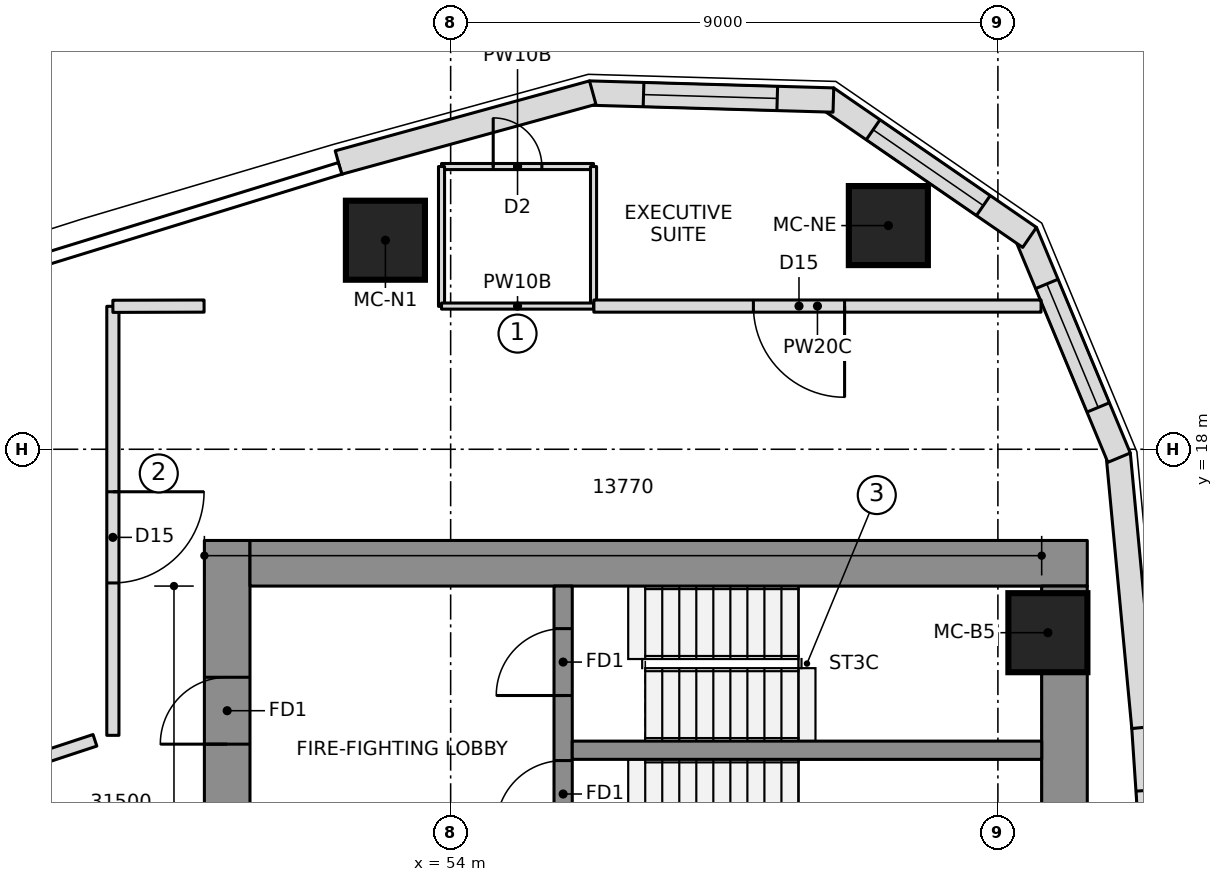
"""IFC4 building model, lengths in metres.
Left out: names, types, materials, properties, quantities, classifications, styles, units other than length and angle.
Written with IfcOpenShell. Run it as: python <this file> out.ifc"""

import sys

from ifc_helpers import new_model, si_unit, direction, frame, frame_2d, origin, origin_2d, place, context, subcontext, project, spatial, polyline, rectangle, outline, extrude, element, fill, save


model = new_model("IFC4")
c1 = context("Model", 3, precision=1e-05, world=origin(), true_north=direction((0.0, 1.0)))
c2 = subcontext(c1, "Body", "Model", "MODEL_VIEW")
j1 = project(units=[si_unit("LENGTHUNIT", "METRE"), si_unit("PLANEANGLEUNIT", "RADIAN")], contexts=[c1])
p1 = place(None, origin())
s1 = spatial("IfcSite", under=j1, at=p1, CompositionType="ELEMENT")
p2 = place(p1, origin())
s2 = spatial("IfcBuilding", under=s1, at=p2, CompositionType="ELEMENT")
p3 = place(p2, frame((0.0, 0.0, 182.6)))
s3 = spatial("IfcBuildingStorey", under=s2, at=p3, CompositionType="ELEMENT", Elevation=182.6)
p4 = place(p3, frame((50.325, 6.65, 0.0), z_axis=(0.0, 0.0, 1.0), x_axis=(0.0, 1.0, 0.0)))
e1 = element("IfcWall", 1, at=p4, inside=s3, PredefinedType="SHEAR", context=c2, shape_type="SweptSolid", body=[
    extrude(rectangle(XDim=9.85, YDim=0.75, at=frame_2d((4.925, 0.0))), origin(), (0.0, 0.0, 1.0), 3.55),
])
p5 = place(p4, frame((6.5, 0.0, 0.0)))
e2 = element("IfcOpeningElement", 2, at=p5, cuts=e1, PredefinedType="OPENING", context=c2, shape_type="SweptSolid", body=[
    extrude(rectangle(XDim=1.1, YDim=2.1, at=frame_2d((0.55, 1.05))), frame((0.0, 0.385, 0.0), z_axis=(0.0, -1.0, 0.0), x_axis=(1.0, 0.0, 0.0)), (0.0, 0.0, 1.0), 0.77),
])
p6 = place(p3, frame((50.7, 16.125, 0.0), z_axis=(0.0, 0.0, 1.0), x_axis=(1.0, 0.0, 0.0)))
e3 = element("IfcWall", 3, at=p6, inside=s3, PredefinedType="SHEAR", context=c2, shape_type="SweptSolid", body=[
    extrude(rectangle(XDim=13.77, YDim=0.75, at=frame_2d((6.885, 0.0))), origin(), (0.0, 0.0, 1.0), 3.55),
])
p7 = place(p3, frame((64.095, 8.099, 0.0), z_axis=(0.0, 0.0, 1.0), x_axis=(0.0, 1.0, 0.0)))
e4 = element("IfcWall", 4, at=p7, inside=s3, PredefinedType="SHEAR", context=c2, shape_type="SweptSolid", body=[
    extrude(rectangle(XDim=7.651, YDim=0.75, at=frame_2d((3.825, 0.0))), origin(), (0.0, 0.0, 1.0), 3.55),
])
p8 = place(p3, frame((55.85, 10.35, 0.0), z_axis=(0.0, 0.0, 1.0), x_axis=(0.0, 1.0, 0.0)))
e5 = element("IfcWall", 5, at=p8, inside=s3, PredefinedType="SHEAR", context=c2, shape_type="SweptSolid", body=[
    extrude(rectangle(XDim=5.4, YDim=0.3, at=frame_2d((2.7, 0.0))), origin(), (0.0, 0.0, 1.0), 3.55),
])
p9 = place(p8, frame((1.43, 0.0, 0.0)))
e6 = element("IfcOpeningElement", 6, at=p9, cuts=e5, PredefinedType="OPENING", context=c2, shape_type="SweptSolid", body=[
    extrude(rectangle(XDim=1.1, YDim=2.1, at=frame_2d((0.55, 1.05))), frame((0.0, 0.16, 0.0), z_axis=(0.0, -1.0, 0.0), x_axis=(1.0, 0.0, 0.0)), (0.0, 0.0, 1.0), 0.32),
])
p10 = place(p8, frame((3.6, 0.0, 0.0)))
e7 = element("IfcOpeningElement", 7, at=p10, cuts=e5, PredefinedType="OPENING", context=c2, shape_type="SweptSolid", body=[
    extrude(rectangle(XDim=1.1, YDim=2.1, at=frame_2d((0.55, 1.05))), frame((0.0, 0.16, 0.0), z_axis=(0.0, -1.0, 0.0), x_axis=(1.0, 0.0, 0.0)), (0.0, 0.0, 1.0), 0.32),
])
p11 = place(p3, frame((56.0, 13.05, 0.0), z_axis=(0.0, 0.0, 1.0), x_axis=(1.0, 0.0, 0.0)))
e8 = element("IfcWall", 8, at=p11, inside=s3, PredefinedType="SHEAR", context=c2, shape_type="SweptSolid", body=[
    extrude(rectangle(XDim=7.72, YDim=0.3, at=frame_2d((3.86, 0.0))), origin(), (0.0, 0.0, 1.0), 3.55),
])
for number, where, z_axis, x_axis in (
    (9, (63.822, 14.983, 0.0), (0.0, 0.0, 1.0), (1.0, 0.0, 0.0)),
    (10, (61.198, 21.679, 0.0), (0.0, 0.0, 1.0), (1.0, 0.0, 0.0)),
    (11, (52.927, 21.438, 0.0), (0.0, 0.0, 1.0), (1.0, 0.0, 0.0)),
):
    element("IfcColumn", number, at=place(p3, frame(where, z_axis=z_axis, x_axis=x_axis)), inside=s3, PredefinedType="COLUMN", context=c2, shape_type="SweptSolid", body=[
        extrude(rectangle(XDim=1.3, YDim=1.3, at=origin_2d()), origin(), (0.0, 0.0, 1.0), 3.55),
    ])
p12 = place(p3, frame((65.7, 8.958, 0.0), z_axis=(0.0, 0.0, 1.0), x_axis=(-0.066905935948, 0.997759287471, 0.0)))
e12 = element("IfcWall", 12, at=p12, inside=s3, PredefinedType="NOTDEFINED", context=c2, shape_type="SweptSolid", body=[
    extrude(outline(polyline([(-0.003, -0.2), (4.484, -0.2), (4.478, 0.2), (0.003, 0.2), (-0.003, -0.2)])), origin(), (0.0, 0.0, 1.0), 3.25),
])
p13 = place(p12, frame((1.04, 0.0, 0.5)))
e13 = element("IfcOpeningElement", 13, at=p13, cuts=e12, PredefinedType="OPENING", context=c2, shape_type="SweptSolid", body=[
    extrude(rectangle(XDim=2.4, YDim=2.0, at=frame_2d((1.2, 1.0))), frame((0.0, 0.21, 0.0), z_axis=(0.0, -1.0, 0.0), x_axis=(1.0, 0.0, 0.0)), (0.0, 0.0, 1.0), 0.42),
])
p14 = place(p3, frame((65.401, 13.429, 0.0), z_axis=(0.0, 0.0, 1.0), x_axis=(-0.093605694738, 0.995609348044, 0.0)))
e14 = element("IfcWall", 14, at=p14, inside=s3, PredefinedType="NOTDEFINED", context=c2, shape_type="SweptSolid", body=[
    extrude(outline(polyline([(-0.003, -0.2), (4.511, -0.2), (4.451, 0.2), (0.003, 0.2), (-0.003, -0.2)])), origin(), (0.0, 0.0, 1.0), 3.25),
])
p15 = place(p3, frame((64.981, 17.89, 0.0), z_axis=(0.0, 0.0, 1.0), x_axis=(-0.383997619794, 0.923334082547, 0.0)))
e15 = element("IfcWall", 15, at=p15, inside=s3, PredefinedType="NOTDEFINED", context=c2, shape_type="SweptSolid", body=[
    extrude(outline(polyline([(-0.03, -0.2), (3.988, -0.2), (3.87, 0.2), (0.03, 0.2), (-0.03, -0.2)])), origin(), (0.0, 0.0, 1.0), 3.25),
])
p16 = place(p15, frame((0.865, 0.0, 0.6)))
e16 = element("IfcOpeningElement", 16, at=p16, cuts=e15, PredefinedType="OPENING", context=c2, shape_type="SweptSolid", body=[
    extrude(outline(polyline([(0.0, 1.35), (0.084, 1.771), (0.322, 2.128), (0.679, 2.366), (1.1, 2.45), (1.521, 2.366), (1.878, 2.128), (2.116, 1.771), (2.2, 1.35), (2.2, 1.1), (2.116, 0.679), (1.878, 0.322), (1.521, 0.084), (1.1, 0.0), (0.679, 0.084), (0.322, 0.322), (0.084, 0.679), (0.0, 1.1), (0.0, 1.35)])), frame((0.0, 0.21, 0.0), z_axis=(0.0, -1.0, 0.0), x_axis=(1.0, 0.0, 0.0)), (0.0, 0.0, 1.0), 0.42),
])
p17 = place(p3, frame((63.472, 21.518, 0.0), z_axis=(0.0, 0.0, 1.0), x_axis=(-0.823806162588, 0.566871596115, 0.0)))
e17 = element("IfcWall", 17, at=p17, inside=s3, PredefinedType="NOTDEFINED", context=c2, shape_type="SweptSolid", body=[
    extrude(outline(polyline([(-0.059, -0.2), (3.988, -0.2), (3.87, 0.2), (0.059, 0.2), (-0.059, -0.2)])), origin(), (0.0, 0.0, 1.0), 3.25),
])
p18 = place(p17, frame((0.865, 0.0, 0.6)))
e18 = element("IfcOpeningElement", 18, at=p18, cuts=e17, PredefinedType="OPENING", context=c2, shape_type="SweptSolid", body=[
    extrude(outline(polyline([(0.0, 1.35), (0.084, 1.771), (0.322, 2.128), (0.679, 2.366), (1.1, 2.45), (1.521, 2.366), (1.878, 2.128), (2.116, 1.771), (2.2, 1.35), (2.2, 1.1), (2.116, 0.679), (1.878, 0.322), (1.521, 0.084), (1.1, 0.0), (0.679, 0.084), (0.322, 0.322), (0.084, 0.679), (0.0, 1.1), (0.0, 1.35)])), frame((0.0, 0.21, 0.0), z_axis=(0.0, -1.0, 0.0), x_axis=(1.0, 0.0, 0.0)), (0.0, 0.0, 1.0), 0.42),
])
p19 = place(p3, frame((60.236, 23.745, 0.0), z_axis=(0.0, 0.0, 1.0), x_axis=(-0.999587920197, 0.028705222472, 0.0)))
e19 = element("IfcWall", 19, at=p19, inside=s3, PredefinedType="NOTDEFINED", context=c2, shape_type="SweptSolid", body=[
    extrude(outline(polyline([(-0.059, -0.2), (3.959, -0.2), (3.9, 0.2), (0.059, 0.2), (-0.059, -0.2)])), origin(), (0.0, 0.0, 1.0), 3.25),
])
p20 = place(p19, frame((0.865, 0.0, 0.6)))
e20 = element("IfcOpeningElement", 20, at=p20, cuts=e19, PredefinedType="OPENING", context=c2, shape_type="SweptSolid", body=[
    extrude(outline(polyline([(0.0, 1.35), (0.084, 1.771), (0.322, 2.128), (0.679, 2.366), (1.1, 2.45), (1.521, 2.366), (1.878, 2.128), (2.116, 1.771), (2.2, 1.35), (2.2, 1.1), (2.116, 0.679), (1.878, 0.322), (1.521, 0.084), (1.1, 0.0), (0.679, 0.084), (0.322, 0.322), (0.084, 0.679), (0.0, 1.1), (0.0, 1.35)])), frame((0.0, 0.21, 0.0), z_axis=(0.0, -1.0, 0.0), x_axis=(1.0, 0.0, 0.0)), (0.0, 0.0, 1.0), 0.42),
])
p21 = place(p3, frame((56.308, 23.858, 0.0), z_axis=(0.0, 0.0, 1.0), x_axis=(-0.964205755089, -0.265155165617, 0.0)))
e21 = element("IfcWall", 21, at=p21, inside=s3, PredefinedType="NOTDEFINED", context=c2, shape_type="SweptSolid", body=[
    extrude(outline(polyline([(-0.03, -0.2), (4.307, -0.2), (4.307, 0.2), (0.03, 0.2), (-0.03, -0.2)])), origin(), (0.0, 0.0, 1.0), 3.25),
])
p22 = place(p3, frame((53.85, 22.65, 0.0), z_axis=(0.0, 0.0, 1.0), x_axis=(1.0, 0.0, 0.0)))
e22 = element("IfcWall", 22, at=p22, inside=s3, PredefinedType="PARTITIONING", context=c2, shape_type="SweptSolid", body=[
    extrude(rectangle(XDim=2.5, YDim=0.1, at=frame_2d((1.25, 0.0))), origin(), (0.0, 0.0, 1.0), 3.25),
])
p23 = place(p22, frame((0.85, 0.0, 0.0)))
e23 = element("IfcOpeningElement", 23, at=p23, cuts=e22, PredefinedType="OPENING", context=c2, shape_type="SweptSolid", body=[
    extrude(rectangle(XDim=0.8, YDim=2.1, at=frame_2d((0.4, 1.05))), frame((0.0, 0.06, 0.0), z_axis=(0.0, -1.0, 0.0), x_axis=(1.0, 0.0, 0.0)), (0.0, 0.0, 1.0), 0.12),
])
for number, where, z_axis, x_axis in (
    (24, (56.35, 22.65, 0.0), (0.0, 0.0, 1.0), (0.0, -1.0, 0.0)),
    (25, (53.85, 20.35, 0.0), (0.0, 0.0, 1.0), (0.0, 1.0, 0.0)),
):
    element("IfcWall", number, at=place(p3, frame(where, z_axis=z_axis, x_axis=x_axis)), inside=s3, PredefinedType="PARTITIONING", context=c2, shape_type="SweptSolid", body=[
        extrude(rectangle(XDim=2.3, YDim=0.1, at=frame_2d((1.15, 0.0))), origin(), (0.0, 0.0, 1.0), 3.25),
    ])
p24 = place(p3, frame((63.709, 20.355, 0.0), z_axis=(0.0, 0.0, 1.0), x_axis=(-1.0, 0.0, 0.0)))
e26 = element("IfcWall", 26, at=p24, inside=s3, PredefinedType="PARTITIONING", context=c2, shape_type="SweptSolid", body=[
    extrude(rectangle(XDim=7.354, YDim=0.2, at=frame_2d((3.677, 0.0))), origin(), (0.0, 0.0, 1.0), 3.25),
])
p25 = place(p24, frame((3.231, 0.0, 0.0)))
e27 = element("IfcOpeningElement", 27, at=p25, cuts=e26, PredefinedType="OPENING", context=c2, shape_type="SweptSolid", body=[
    extrude(rectangle(XDim=1.5, YDim=2.1, at=frame_2d((0.75, 1.05))), frame((0.0, 0.11, 0.0), z_axis=(0.0, -1.0, 0.0), x_axis=(1.0, 0.0, 0.0)), (0.0, 0.0, 1.0), 0.22),
])
p26 = place(p3, frame((56.35, 20.355, 0.0), z_axis=(0.0, 0.0, 1.0), x_axis=(-1.0, 0.0, 0.0)))
e28 = element("IfcWall", 28, at=p26, inside=s3, PredefinedType="PARTITIONING", context=c2, shape_type="SweptSolid", body=[
    extrude(rectangle(XDim=2.5, YDim=0.1, at=frame_2d((1.25, 0.0))), origin(), (0.0, 0.0, 1.0), 3.25),
])
p27 = place(p3, frame((48.15, 13.213, 0.0), z_axis=(0.0, 0.0, 1.0), x_axis=(-0.949729856115, -0.313070599711, 0.0)))
e29 = element("IfcWall", 29, at=p27, inside=s3, PredefinedType="PARTITIONING", context=c2, shape_type="SweptSolid", body=[
    extrude(rectangle(XDim=3.853, YDim=0.2, at=frame_2d((1.927, 0.0))), origin(), (0.0, 0.0, 1.0), 3.25),
])
p28 = place(p3, frame((48.445, 20.351, 0.0), z_axis=(0.0, 0.0, 1.0), x_axis=(0.0, -1.0, 0.0)))
e30 = element("IfcWall", 30, at=p28, inside=s3, PredefinedType="PARTITIONING", context=c2, shape_type="SweptSolid", body=[
    extrude(rectangle(XDim=7.056, YDim=0.2, at=frame_2d((3.528, 0.0))), origin(), (0.0, 0.0, 1.0), 3.25),
])
p29 = place(p28, frame((3.05, 0.0, 0.0)))
e31 = element("IfcOpeningElement", 31, at=p29, cuts=e30, PredefinedType="OPENING", context=c2, shape_type="SweptSolid", body=[
    extrude(rectangle(XDim=1.5, YDim=2.1, at=frame_2d((0.75, 1.05))), frame((0.0, 0.11, 0.0), z_axis=(0.0, -1.0, 0.0), x_axis=(1.0, 0.0, 0.0)), (0.0, 0.0, 1.0), 0.22),
])
p30 = place(p3, frame((49.945, 20.355, 0.0), z_axis=(0.0, 0.0, 1.0), x_axis=(-0.999996609175, -0.002604157836, 0.0)))
e32 = element("IfcWall", 32, at=p30, inside=s3, PredefinedType="PARTITIONING", context=c2, shape_type="SweptSolid", body=[
    extrude(rectangle(XDim=1.5, YDim=0.2, at=frame_2d((0.75, 0.0))), origin(), (0.0, 0.0, 1.0), 3.25),
])
p31 = place(p13, origin())
e33 = element("IfcWindow", 33, at=p31, inside=s3, PartitioningType="SINGLE_PANEL", PredefinedType="WINDOW", context=c2, shape_type="SweptSolid", body=[
    extrude(rectangle(XDim=2.4, YDim=2.0, at=frame_2d((1.2, 1.0))), frame((0.0, 0.17, 0.0), z_axis=(0.0, -1.0, 0.0), x_axis=(1.0, 0.0, 0.0)), (0.0, 0.0, 1.0), 0.06),
])
fill(e13, e33)
p32 = place(p16, origin())
e34 = element("IfcWindow", 34, at=p32, inside=s3, PartitioningType="SINGLE_PANEL", PredefinedType="WINDOW", context=c2, shape_type="SweptSolid", body=[
    extrude(outline(polyline([(0.0, 1.35), (0.084, 1.771), (0.322, 2.128), (0.679, 2.366), (1.1, 2.45), (1.521, 2.366), (1.878, 2.128), (2.116, 1.771), (2.2, 1.35), (2.2, 1.1), (2.116, 0.679), (1.878, 0.322), (1.521, 0.084), (1.1, 0.0), (0.679, 0.084), (0.322, 0.322), (0.084, 0.679), (0.0, 1.1), (0.0, 1.35)])), frame((0.0, 0.17, 0.0), z_axis=(0.0, -1.0, 0.0), x_axis=(1.0, 0.0, 0.0)), (0.0, 0.0, 1.0), 0.06),
])
fill(e16, e34)
p33 = place(p18, origin())
e35 = element("IfcWindow", 35, at=p33, inside=s3, PartitioningType="SINGLE_PANEL", PredefinedType="WINDOW", context=c2, shape_type="SweptSolid", body=[
    extrude(outline(polyline([(0.0, 1.35), (0.084, 1.771), (0.322, 2.128), (0.679, 2.366), (1.1, 2.45), (1.521, 2.366), (1.878, 2.128), (2.116, 1.771), (2.2, 1.35), (2.2, 1.1), (2.116, 0.679), (1.878, 0.322), (1.521, 0.084), (1.1, 0.0), (0.679, 0.084), (0.322, 0.322), (0.084, 0.679), (0.0, 1.1), (0.0, 1.35)])), frame((0.0, 0.17, 0.0), z_axis=(0.0, -1.0, 0.0), x_axis=(1.0, 0.0, 0.0)), (0.0, 0.0, 1.0), 0.06),
])
fill(e18, e35)
p34 = place(p20, origin())
e36 = element("IfcWindow", 36, at=p34, inside=s3, PartitioningType="SINGLE_PANEL", PredefinedType="WINDOW", context=c2, shape_type="SweptSolid", body=[
    extrude(outline(polyline([(0.0, 1.35), (0.084, 1.771), (0.322, 2.128), (0.679, 2.366), (1.1, 2.45), (1.521, 2.366), (1.878, 2.128), (2.116, 1.771), (2.2, 1.35), (2.2, 1.1), (2.116, 0.679), (1.878, 0.322), (1.521, 0.084), (1.1, 0.0), (0.679, 0.084), (0.322, 0.322), (0.084, 0.679), (0.0, 1.1), (0.0, 1.35)])), frame((0.0, 0.17, 0.0), z_axis=(0.0, -1.0, 0.0), x_axis=(1.0, 0.0, 0.0)), (0.0, 0.0, 1.0), 0.06),
])
fill(e20, e36)
p35 = place(p23, origin())
e37 = element("IfcDoor", 37, at=p35, inside=s3, OperationType="SINGLE_SWING_LEFT", PredefinedType="DOOR", context=c2, shape_type="SweptSolid", body=[
    extrude(rectangle(XDim=0.8, YDim=2.1, at=frame_2d((0.4, 1.05))), frame((0.0, 0.025, 0.0), z_axis=(0.0, -1.0, 0.0), x_axis=(1.0, 0.0, 0.0)), (0.0, 0.0, 1.0), 0.05),
])
fill(e23, e37)
p36 = place(p25, origin())
e38 = element("IfcDoor", 38, at=p36, inside=s3, OperationType="DOUBLE_DOOR_SINGLE_SWING", PredefinedType="DOOR", context=c2, shape_type="SweptSolid", body=[
    extrude(rectangle(XDim=1.5, YDim=2.1, at=frame_2d((0.75, 1.05))), frame((0.0, 0.025, 0.0), z_axis=(0.0, -1.0, 0.0), x_axis=(1.0, 0.0, 0.0)), (0.0, 0.0, 1.0), 0.05),
])
fill(e27, e38)
p37 = place(p29, origin())
e39 = element("IfcDoor", 39, at=p37, inside=s3, OperationType="DOUBLE_DOOR_SINGLE_SWING", PredefinedType="DOOR", context=c2, shape_type="SweptSolid", body=[
    extrude(rectangle(XDim=1.5, YDim=2.1, at=frame_2d((0.75, 1.05))), frame((0.0, 0.025, 0.0), z_axis=(0.0, -1.0, 0.0), x_axis=(1.0, 0.0, 0.0)), (0.0, 0.0, 1.0), 0.05),
])
fill(e31, e39)
p38 = place(p9, origin())
e40 = element("IfcDoor", 40, at=p38, inside=s3, OperationType="SINGLE_SWING_RIGHT", PredefinedType="DOOR", context=c2, shape_type="SweptSolid", body=[
    extrude(rectangle(XDim=1.1, YDim=2.1, at=frame_2d((0.55, 1.05))), frame((0.0, 0.025, 0.0), z_axis=(0.0, -1.0, 0.0), x_axis=(1.0, 0.0, 0.0)), (0.0, 0.0, 1.0), 0.05),
])
fill(e6, e40)
p39 = place(p10, origin())
e41 = element("IfcDoor", 41, at=p39, inside=s3, OperationType="SINGLE_SWING_RIGHT", PredefinedType="DOOR", context=c2, shape_type="SweptSolid", body=[
    extrude(rectangle(XDim=1.1, YDim=2.1, at=frame_2d((0.55, 1.05))), frame((0.0, 0.025, 0.0), z_axis=(0.0, -1.0, 0.0), x_axis=(1.0, 0.0, 0.0)), (0.0, 0.0, 1.0), 0.05),
])
fill(e7, e41)
p40 = place(p5, origin())
e42 = element("IfcDoor", 42, at=p40, inside=s3, OperationType="SINGLE_SWING_RIGHT", PredefinedType="DOOR", context=c2, shape_type="SweptSolid", body=[
    extrude(rectangle(XDim=1.1, YDim=2.1, at=frame_2d((0.55, 1.05))), frame((0.0, 0.025, 0.0), z_axis=(0.0, -1.0, 0.0), x_axis=(1.0, 0.0, 0.0)), (0.0, 0.0, 1.0), 0.05),
])
fill(e2, e42)
save(model, sys.argv[1])
